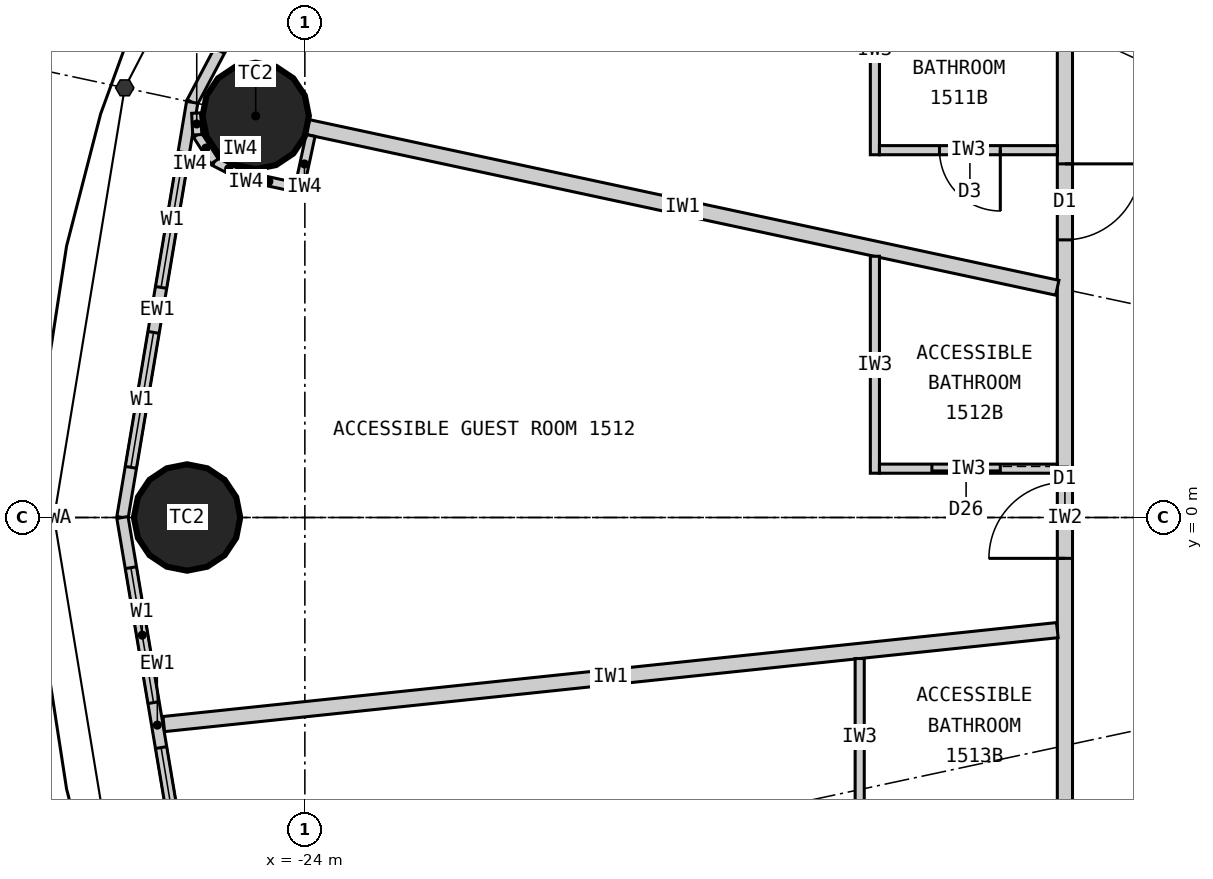
"""IFC4 building model, lengths in metres.
Left out: names, types, materials, properties, quantities, classifications, styles, units other than length and angle.
Written with IfcOpenShell. Run it as: python <this file> out.ifc"""

import sys

from ifc_helpers import new_model, si_unit, direction, frame, frame_2d, origin, origin_2d, place, context, subcontext, project, spatial, rectangle, circle, extrude, element, fill, save


model = new_model("IFC4")
c1 = context("Model", 3, precision=1e-05, world=origin(), true_north=direction((0.0, 1.0)))
c2 = subcontext(c1, "Body", "Model", "MODEL_VIEW")
j1 = project(units=[si_unit("LENGTHUNIT", "METRE"), si_unit("PLANEANGLEUNIT", "RADIAN")], contexts=[c1])
p1 = place(None, origin())
s1 = spatial("IfcSite", under=j1, at=p1, CompositionType="ELEMENT")
p2 = place(p1, origin())
s2 = spatial("IfcBuilding", under=s1, at=p2, CompositionType="ELEMENT")
p3 = place(p2, frame((0.0, 0.0, 63.9)))
s3 = spatial("IfcBuildingStorey", under=s2, at=p3, CompositionType="ELEMENT", Elevation=63.9)
for number, where, z_axis, x_axis in (
    (1, (-24.647, 5.283, 0.0), (0.0, 0.0, 1.0), (1.0, 0.0, 0.0)),
    (2, (-25.55, 0.0, 0.0), (0.0, 0.0, 1.0), (1.0, 0.0, 0.0)),
):
    element("IfcColumn", number, at=place(p3, frame(where, z_axis=z_axis, x_axis=x_axis)), inside=s3, PredefinedType="COLUMN", context=c2, shape_type="SweptSolid", body=[
        extrude(circle(Radius=0.7, at=origin_2d()), origin(), (0.0, 0.0, 1.0), 3.3),
    ])
p4 = place(p3, frame((-22.803, 10.532, 0.0), z_axis=(0.0, 0.0, 1.0), x_axis=(-0.467296867008, -0.884100468321, 0.0)))
e3 = element("IfcWall", 3, at=p4, inside=s3, PredefinedType="ELEMENTEDWALL", context=c2, shape_type="SweptSolid", body=[
    extrude(rectangle(XDim=5.734, YDim=0.15, at=frame_2d((2.867, 0.0))), origin(), (0.0, 0.0, 1.0), 3.12),
])
p5 = place(p4, frame((0.767, 0.0, 0.9)))
e4 = element("IfcOpeningElement", 4, at=p5, cuts=e3, PredefinedType="OPENING", context=c2, shape_type="SweptSolid", body=[
    extrude(rectangle(XDim=1.8, YDim=1.9, at=frame_2d((0.9, 0.95))), frame((0.0, 0.085, 0.0), z_axis=(0.0, -1.0, 0.0), x_axis=(1.0, 0.0, 0.0)), (0.0, 0.0, 1.0), 0.17),
])
p6 = place(p4, frame((3.167, 0.0, 0.9)))
e5 = element("IfcOpeningElement", 5, at=p6, cuts=e3, PredefinedType="OPENING", context=c2, shape_type="SweptSolid", body=[
    extrude(rectangle(XDim=1.8, YDim=1.9, at=frame_2d((0.9, 0.95))), frame((0.0, 0.085, 0.0), z_axis=(0.0, -1.0, 0.0), x_axis=(1.0, 0.0, 0.0)), (0.0, 0.0, 1.0), 0.17),
])
p7 = place(p3, frame((-25.482, 5.462, 0.0), z_axis=(0.0, 0.0, 1.0), x_axis=(-0.165642551694, -0.986185857264, 0.0)))
e6 = element("IfcWall", 6, at=p7, inside=s3, PredefinedType="ELEMENTEDWALL", context=c2, shape_type="SweptSolid", body=[
    extrude(rectangle(XDim=5.539, YDim=0.15, at=frame_2d((2.77, 0.0))), origin(), (0.0, 0.0, 1.0), 3.12),
])
p8 = place(p7, frame((0.669, 0.0, 0.9)))
e7 = element("IfcOpeningElement", 7, at=p8, cuts=e6, PredefinedType="OPENING", context=c2, shape_type="SweptSolid", body=[
    extrude(rectangle(XDim=1.8, YDim=1.9, at=frame_2d((0.9, 0.95))), frame((0.0, 0.085, 0.0), z_axis=(0.0, -1.0, 0.0), x_axis=(1.0, 0.0, 0.0)), (0.0, 0.0, 1.0), 0.17),
])
p9 = place(p7, frame((3.07, 0.0, 0.9)))
e8 = element("IfcOpeningElement", 8, at=p9, cuts=e6, PredefinedType="OPENING", context=c2, shape_type="SweptSolid", body=[
    extrude(rectangle(XDim=1.8, YDim=1.9, at=frame_2d((0.9, 0.95))), frame((0.0, 0.085, 0.0), z_axis=(0.0, -1.0, 0.0), x_axis=(1.0, 0.0, 0.0)), (0.0, 0.0, 1.0), 0.17),
])
p10 = place(p3, frame((-26.4, 0.0, 0.0), z_axis=(0.0, 0.0, 1.0), x_axis=(0.165642551694, -0.986185857264, 0.0)))
e9 = element("IfcWall", 9, at=p10, inside=s3, PredefinedType="ELEMENTEDWALL", context=c2, shape_type="SweptSolid", body=[
    extrude(rectangle(XDim=5.539, YDim=0.15, at=frame_2d((2.77, 0.0))), origin(), (0.0, 0.0, 1.0), 3.12),
])
p11 = place(p10, frame((0.669, 0.0, 0.9)))
e10 = element("IfcOpeningElement", 10, at=p11, cuts=e9, PredefinedType="OPENING", context=c2, shape_type="SweptSolid", body=[
    extrude(rectangle(XDim=1.8, YDim=1.9, at=frame_2d((0.9, 0.95))), frame((0.0, 0.085, 0.0), z_axis=(0.0, -1.0, 0.0), x_axis=(1.0, 0.0, 0.0)), (0.0, 0.0, 1.0), 0.17),
])
p12 = place(p10, frame((3.07, 0.0, 0.9)))
e11 = element("IfcOpeningElement", 11, at=p12, cuts=e9, PredefinedType="OPENING", context=c2, shape_type="SweptSolid", body=[
    extrude(rectangle(XDim=1.8, YDim=1.9, at=frame_2d((0.9, 0.95))), frame((0.0, 0.085, 0.0), z_axis=(0.0, -1.0, 0.0), x_axis=(1.0, 0.0, 0.0)), (0.0, 0.0, 1.0), 0.17),
])
p13 = place(p3, frame((-14.0, 9.9, 0.0), z_axis=(0.0, 0.0, 1.0), x_axis=(0.0, -1.0, 0.0)))
e12 = element("IfcWall", 12, at=p13, inside=s3, PredefinedType="PARTITIONING", context=c2, shape_type="SweptSolid", body=[
    extrude(rectangle(XDim=19.8, YDim=0.2, at=frame_2d((9.9, 0.0))), origin(), (0.0, 0.0, 1.0), 3.12),
])
p14 = place(p13, frame((0.103, 0.0, 0.0)))
e13 = element("IfcOpeningElement", 13, at=p14, cuts=e12, PredefinedType="OPENING", context=c2, shape_type="SweptSolid", body=[
    extrude(rectangle(XDim=1.0, YDim=2.2, at=frame_2d((0.5, 1.1))), frame((0.0, 0.11, 0.0), z_axis=(0.0, -1.0, 0.0), x_axis=(1.0, 0.0, 0.0)), (0.0, 0.0, 1.0), 0.22),
])
p15 = place(p13, frame((5.248, 0.0, 0.0)))
e14 = element("IfcOpeningElement", 14, at=p15, cuts=e12, PredefinedType="OPENING", context=c2, shape_type="SweptSolid", body=[
    extrude(rectangle(XDim=1.0, YDim=2.2, at=frame_2d((0.5, 1.1))), frame((0.0, 0.11, 0.0), z_axis=(0.0, -1.0, 0.0), x_axis=(1.0, 0.0, 0.0)), (0.0, 0.0, 1.0), 0.22),
])
p16 = place(p13, frame((9.438, 0.0, 0.0)))
e15 = element("IfcOpeningElement", 15, at=p16, cuts=e12, PredefinedType="OPENING", context=c2, shape_type="SweptSolid", body=[
    extrude(rectangle(XDim=1.0, YDim=2.2, at=frame_2d((0.5, 1.1))), frame((0.0, 0.11, 0.0), z_axis=(0.0, -1.0, 0.0), x_axis=(1.0, 0.0, 0.0)), (0.0, 0.0, 1.0), 0.22),
])
p17 = place(p13, frame((13.942, 0.0, 0.0)))
e16 = element("IfcOpeningElement", 16, at=p17, cuts=e12, PredefinedType="OPENING", context=c2, shape_type="SweptSolid", body=[
    extrude(rectangle(XDim=1.0, YDim=2.2, at=frame_2d((0.5, 1.1))), frame((0.0, 0.11, 0.0), z_axis=(0.0, -1.0, 0.0), x_axis=(1.0, 0.0, 0.0)), (0.0, 0.0, 1.0), 0.22),
])
p18 = place(p13, frame((18.698, 0.0, 0.0)))
e17 = element("IfcOpeningElement", 17, at=p18, cuts=e12, PredefinedType="OPENING", context=c2, shape_type="SweptSolid", body=[
    extrude(rectangle(XDim=1.0, YDim=2.2, at=frame_2d((0.5, 1.1))), frame((0.0, 0.11, 0.0), z_axis=(0.0, -1.0, 0.0), x_axis=(1.0, 0.0, 0.0)), (0.0, 0.0, 1.0), 0.22),
])
p19 = place(p3, frame((-14.1, 3.022, 0.0), z_axis=(0.0, 0.0, 1.0), x_axis=(-0.977790014929, 0.209586943072, 0.0)))
e18 = element("IfcWall", 18, at=p19, inside=s3, PredefinedType="PARTITIONING", context=c2, shape_type="SweptSolid", body=[
    extrude(rectangle(XDim=10.087, YDim=0.2, at=frame_2d((5.043, 0.0))), origin(), (0.0, 0.0, 1.0), 2.32),
])
p20 = place(p3, frame((-14.1, -1.482, 0.0), z_axis=(0.0, 0.0, 1.0), x_axis=(-0.994522076235, -0.104526742422, 0.0)))
e19 = element("IfcWall", 19, at=p20, inside=s3, PredefinedType="PARTITIONING", context=c2, shape_type="SweptSolid", body=[
    extrude(rectangle(XDim=11.821, YDim=0.2, at=frame_2d((5.91, 0.0))), origin(), (0.0, 0.0, 1.0), 2.32),
])
p21 = place(p3, frame((-16.5, 7.521, 0.0), z_axis=(0.0, 0.0, 1.0), x_axis=(0.0, -1.0, 0.0)))
e20 = element("IfcWall", 20, at=p21, inside=s3, PredefinedType="PARTITIONING", context=c2, shape_type="SweptSolid", body=[
    extrude(rectangle(XDim=2.749, YDim=0.12, at=frame_2d((1.374, 0.0))), origin(), (0.0, 0.0, 1.0), 3.12),
])
p22 = place(p3, frame((-14.1, 4.833, 0.0), z_axis=(0.0, 0.0, 1.0), x_axis=(-1.0, 0.0, 0.0)))
e21 = element("IfcWall", 21, at=p22, inside=s3, PredefinedType="PARTITIONING", context=c2, shape_type="SweptSolid", body=[
    extrude(rectangle(XDim=2.34, YDim=0.12, at=frame_2d((1.17, 0.0))), origin(), (0.0, 0.0, 1.0), 3.12),
])
p23 = place(p22, frame((0.75, 0.0, 0.0)))
e22 = element("IfcOpeningElement", 22, at=p23, cuts=e21, PredefinedType="OPENING", context=c2, shape_type="SweptSolid", body=[
    extrude(rectangle(XDim=0.8, YDim=2.1, at=frame_2d((0.4, 1.05))), frame((0.0, 0.07, 0.0), z_axis=(0.0, -1.0, 0.0), x_axis=(1.0, 0.0, 0.0)), (0.0, 0.0, 1.0), 0.14),
])
p24 = place(p3, frame((-16.5, 3.437, 0.0), z_axis=(0.0, 0.0, 1.0), x_axis=(0.0, -1.0, 0.0)))
e23 = element("IfcWall", 23, at=p24, inside=s3, PredefinedType="PARTITIONING", context=c2, shape_type="SweptSolid", body=[
    extrude(rectangle(XDim=2.854, YDim=0.12, at=frame_2d((1.427, 0.0))), origin(), (0.0, 0.0, 1.0), 3.12),
])
p25 = place(p3, frame((-14.1, 0.643, 0.0), z_axis=(0.0, 0.0, 1.0), x_axis=(-1.0, 0.0, 0.0)))
e24 = element("IfcWall", 24, at=p25, inside=s3, PredefinedType="PARTITIONING", context=c2, shape_type="SweptSolid", body=[
    extrude(rectangle(XDim=2.34, YDim=0.12, at=frame_2d((1.17, 0.0))), origin(), (0.0, 0.0, 1.0), 3.12),
])
p26 = place(p25, frame((0.75, 0.0, 0.0)))
e25 = element("IfcOpeningElement", 25, at=p26, cuts=e24, PredefinedType="OPENING", context=c2, shape_type="SweptSolid", body=[
    extrude(rectangle(XDim=0.9, YDim=2.1, at=frame_2d((0.45, 1.05))), frame((0.0, 0.07, 0.0), z_axis=(0.0, -1.0, 0.0), x_axis=(1.0, 0.0, 0.0)), (0.0, 0.0, 1.0), 0.14),
])
p27 = place(p3, frame((-16.7, -1.855, 0.0), z_axis=(0.0, 0.0, 1.0), x_axis=(0.0, -1.0, 0.0)))
e26 = element("IfcWall", 26, at=p27, inside=s3, PredefinedType="PARTITIONING", context=c2, shape_type="SweptSolid", body=[
    extrude(rectangle(XDim=2.067, YDim=0.12, at=frame_2d((1.033, 0.0))), origin(), (0.0, 0.0, 1.0), 3.12),
])
p28 = place(p3, frame((-23.925, 5.026, 0.0), z_axis=(0.0, 0.0, 1.0), x_axis=(-0.209681192172, -0.977769808109, 0.0)))
e27 = element("IfcWall", 27, at=p28, inside=s3, PredefinedType="PARTITIONING", context=c2, shape_type="SweptSolid", body=[
    extrude(rectangle(XDim=0.767, YDim=0.12, at=frame_2d((0.384, 0.0))), origin(), (0.0, 0.0, 1.0), 3.12),
])
p29 = place(p3, frame((-24.132, 4.347, 0.0), z_axis=(0.0, 0.0, 1.0), x_axis=(-0.977776882509, 0.209648200638, 0.0)))
e28 = element("IfcWall", 28, at=p29, inside=s3, PredefinedType="PARTITIONING", context=c2, shape_type="SweptSolid", body=[
    extrude(rectangle(XDim=0.7, YDim=0.12, at=frame_2d((0.35, 0.0))), origin(), (0.0, 0.0, 1.0), 3.12),
])
for number, where, z_axis, x_axis in (
    (29, (-24.816, 4.494, 0.0), (0.0, 0.0, 1.0), (-0.89, 0.455, 0.0)),
    (30, (-25.188, 4.684, 0.0), (0.0, 0.0, 1.0), (-0.543, 0.84, 0.0)),
):
    element("IfcWall", number, at=place(p3, frame(where, z_axis=z_axis, x_axis=x_axis)), inside=s3, PredefinedType="PARTITIONING", context=c2, shape_type="SweptSolid", body=[
        extrude(rectangle(XDim=0.418, YDim=0.12, at=frame_2d((0.209, 0.0))), origin(), (0.0, 0.0, 1.0), 3.12),
    ])
p30 = place(p3, frame((-25.416, 5.035, 0.0), z_axis=(0.0, 0.0, 1.0), x_axis=(-0.050406329159, 0.998728793007, 0.0)))
e31 = element("IfcWall", 31, at=p30, inside=s3, PredefinedType="PARTITIONING", context=c2, shape_type="SweptSolid", body=[
    extrude(rectangle(XDim=0.286, YDim=0.12, at=frame_2d((0.143, 0.0))), origin(), (0.0, 0.0, 1.0), 3.12),
])
p31 = place(p8, origin())
e32 = element("IfcWindow", 32, at=p31, inside=s3, PartitioningType="SINGLE_PANEL", PredefinedType="WINDOW", context=c2, shape_type="SweptSolid", body=[
    extrude(rectangle(XDim=1.8, YDim=1.9, at=frame_2d((0.9, 0.95))), frame((0.0, 0.03, 0.0), z_axis=(0.0, -1.0, 0.0), x_axis=(1.0, 0.0, 0.0)), (0.0, 0.0, 1.0), 0.06),
])
fill(e7, e32)
p32 = place(p9, origin())
e33 = element("IfcWindow", 33, at=p32, inside=s3, PartitioningType="SINGLE_PANEL", PredefinedType="WINDOW", context=c2, shape_type="SweptSolid", body=[
    extrude(rectangle(XDim=1.8, YDim=1.9, at=frame_2d((0.9, 0.95))), frame((0.0, 0.03, 0.0), z_axis=(0.0, -1.0, 0.0), x_axis=(1.0, 0.0, 0.0)), (0.0, 0.0, 1.0), 0.06),
])
fill(e8, e33)
p33 = place(p11, origin())
e34 = element("IfcWindow", 34, at=p33, inside=s3, PartitioningType="SINGLE_PANEL", PredefinedType="WINDOW", context=c2, shape_type="SweptSolid", body=[
    extrude(rectangle(XDim=1.8, YDim=1.9, at=frame_2d((0.9, 0.95))), frame((0.0, 0.03, 0.0), z_axis=(0.0, -1.0, 0.0), x_axis=(1.0, 0.0, 0.0)), (0.0, 0.0, 1.0), 0.06),
])
fill(e10, e34)
p34 = place(p12, origin())
e35 = element("IfcWindow", 35, at=p34, inside=s3, PartitioningType="SINGLE_PANEL", PredefinedType="WINDOW", context=c2, shape_type="SweptSolid", body=[
    extrude(rectangle(XDim=1.8, YDim=1.9, at=frame_2d((0.9, 0.95))), frame((0.0, 0.03, 0.0), z_axis=(0.0, -1.0, 0.0), x_axis=(1.0, 0.0, 0.0)), (0.0, 0.0, 1.0), 0.06),
])
fill(e11, e35)
p35 = place(p23, origin())
e36 = element("IfcDoor", 36, at=p35, inside=s3, OperationType="SINGLE_SWING_LEFT", PredefinedType="DOOR", context=c2, shape_type="SweptSolid", body=[
    extrude(rectangle(XDim=0.8, YDim=2.1, at=frame_2d((0.4, 1.05))), frame((0.0, 0.025, 0.0), z_axis=(0.0, -1.0, 0.0), x_axis=(1.0, 0.0, 0.0)), (0.0, 0.0, 1.0), 0.05),
])
fill(e22, e36)
p36 = place(p15, origin())
e37 = element("IfcDoor", 37, at=p36, inside=s3, OperationType="SINGLE_SWING_LEFT", PredefinedType="DOOR", context=c2, shape_type="SweptSolid", body=[
    extrude(rectangle(XDim=1.0, YDim=2.2, at=frame_2d((0.5, 1.1))), frame((0.0, 0.025, 0.0), z_axis=(0.0, -1.0, 0.0), x_axis=(1.0, 0.0, 0.0)), (0.0, 0.0, 1.0), 0.05),
])
fill(e14, e37)
p37 = place(p26, origin())
e38 = element("IfcDoor", 38, at=p37, inside=s3, OperationType="SLIDING_TO_LEFT", PredefinedType="DOOR", context=c2, shape_type="SweptSolid", body=[
    extrude(rectangle(XDim=0.9, YDim=2.1, at=frame_2d((0.45, 1.05))), frame((0.0, 0.025, 0.0), z_axis=(0.0, -1.0, 0.0), x_axis=(1.0, 0.0, 0.0)), (0.0, 0.0, 1.0), 0.05),
])
fill(e25, e38)
p38 = place(p16, origin())
e39 = element("IfcDoor", 39, at=p38, inside=s3, OperationType="SINGLE_SWING_RIGHT", PredefinedType="DOOR", context=c2, shape_type="SweptSolid", body=[
    extrude(rectangle(XDim=1.0, YDim=2.2, at=frame_2d((0.5, 1.1))), frame((0.0, 0.025, 0.0), z_axis=(0.0, -1.0, 0.0), x_axis=(1.0, 0.0, 0.0)), (0.0, 0.0, 1.0), 0.05),
])
fill(e15, e39)
save(model, sys.argv[1])
